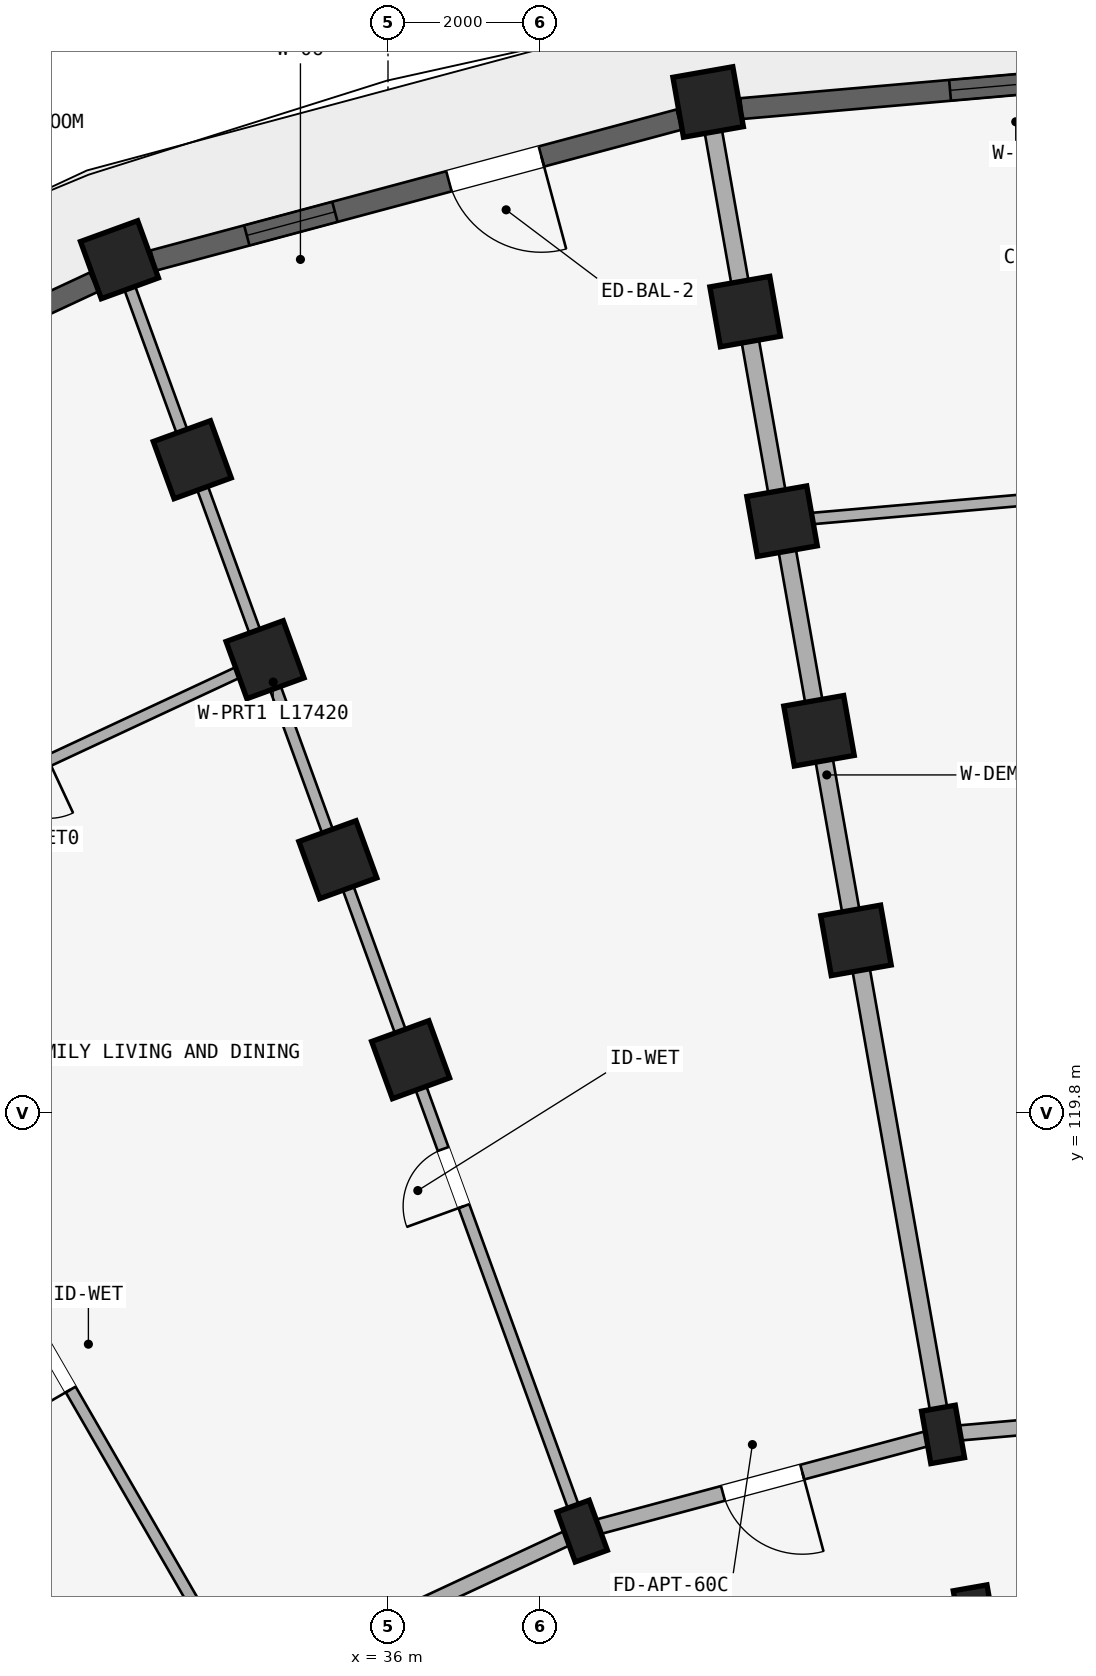
"""IFC4 building model, lengths in metres.
Left out: names, types, materials, properties, quantities, classifications, styles, units other than length and angle.
Written with IfcOpenShell. Run it as: python <this file> out.ifc"""

import sys

from ifc_helpers import new_model, si_unit, direction, frame, frame_2d, origin, origin_2d, place, context, subcontext, project, spatial, rectangle, extrude, element, fill, save


model = new_model("IFC4")
c1 = context("Model", 3, precision=1e-05, world=origin(), true_north=direction((0.0, 1.0)))
c2 = subcontext(c1, "Body", "Model", "MODEL_VIEW")
j1 = project(units=[si_unit("LENGTHUNIT", "METRE"), si_unit("PLANEANGLEUNIT", "RADIAN")], contexts=[c1])
p1 = place(None, origin())
s1 = spatial("IfcSite", under=j1, at=p1, CompositionType="ELEMENT")
p2 = place(p1, origin())
s2 = spatial("IfcBuilding", under=s1, at=p2, CompositionType="ELEMENT")
p3 = place(p2, frame((0.0, 0.0, 11.85)))
s3 = spatial("IfcBuildingStorey", under=s2, at=p3, CompositionType="ELEMENT", Elevation=11.85)
for number, where, z_axis, x_axis in (
    (1, (43.72, 113.208, 0.0), (0.0, 0.0, 1.0), (0.985, 0.174, 0.0)),
    (2, (43.303, 115.572, 0.0), (0.0, 0.0, 1.0), (0.985, 0.174, 0.0)),
):
    element("IfcColumn", number, at=place(p3, frame(where, z_axis=z_axis, x_axis=x_axis)), inside=s3, PredefinedType="COLUMN", context=c2, shape_type="SweptSolid", body=[
        extrude(rectangle(XDim=0.45, YDim=0.7, at=origin_2d()), origin(), (0.0, 0.0, 1.0), 2.93),
    ])
for number, where, z_axis, x_axis in (
    (3, (42.157, 122.071, 0.0), (0.0, 0.0, 1.0), (0.985, 0.174, 0.0)),
    (4, (41.671, 124.829, 0.0), (0.0, 0.0, 1.0), (0.985, 0.174, 0.0)),
    (5, (41.185, 127.586, 0.0), (0.0, 0.0, 1.0), (0.985, 0.174, 0.0)),
    (6, (40.698, 130.344, 0.0), (0.0, 0.0, 1.0), (0.985, 0.174, 0.0)),
    (7, (40.212, 133.101, 0.0), (0.0, 0.0, 1.0), (0.985, 0.174, 0.0)),
):
    element("IfcColumn", number, at=place(p3, frame(where, z_axis=z_axis, x_axis=x_axis)), inside=s3, PredefinedType="COLUMN", context=c2, shape_type="SweptSolid", body=[
        extrude(rectangle(XDim=0.8, YDim=0.8, at=origin_2d()), origin(), (0.0, 0.0, 1.0), 2.93),
    ])
p4 = place(p3, frame((38.555, 114.299, 0.0), z_axis=(0.0, 0.0, 1.0), x_axis=(0.939692620786, 0.342020143326, 0.0)))
e8 = element("IfcColumn", 8, at=p4, inside=s3, PredefinedType="COLUMN", context=c2, shape_type="SweptSolid", body=[
    extrude(rectangle(XDim=0.45, YDim=0.7, at=origin_2d()), origin(), (0.0, 0.0, 1.0), 2.93),
])
for number, where, z_axis, x_axis in (
    (9, (36.298, 120.501, 0.0), (0.0, 0.0, 1.0), (0.94, 0.342, 0.0)),
    (10, (35.34, 123.132, 0.0), (0.0, 0.0, 1.0), (0.94, 0.342, 0.0)),
    (11, (34.382, 125.764, 0.0), (0.0, 0.0, 1.0), (0.94, 0.342, 0.0)),
    (12, (33.425, 128.395, 0.0), (0.0, 0.0, 1.0), (0.94, 0.342, 0.0)),
    (13, (32.467, 131.026, 0.0), (0.0, 0.0, 1.0), (0.94, 0.342, 0.0)),
):
    element("IfcColumn", number, at=place(p3, frame(where, z_axis=z_axis, x_axis=x_axis)), inside=s3, PredefinedType="COLUMN", context=c2, shape_type="SweptSolid", body=[
        extrude(rectangle(XDim=0.8, YDim=0.8, at=origin_2d()), origin(), (0.0, 0.0, 1.0), 2.93),
    ])
p5 = place(p3, frame((48.2, 113.6, 0.0), z_axis=(0.0, 0.0, 1.0), x_axis=(-0.996191949488, -0.087187153726, 0.0)))
e14 = element("IfcWall", 14, at=p5, inside=s3, PredefinedType="STANDARD", context=c2, shape_type="SweptSolid", body=[
    extrude(rectangle(XDim=4.497, YDim=0.2, at=frame_2d((2.249, 0.0))), origin(), (0.0, 0.0, 1.0), 2.372),
])
p6 = place(p5, frame((1.729, 0.0, 0.0)))
e15 = element("IfcOpeningElement", 15, at=p6, cuts=e14, PredefinedType="OPENING", context=c2, shape_type="SweptSolid", body=[
    extrude(rectangle(XDim=1.04, YDim=2.15, at=frame_2d((0.52, 1.075))), frame((0.0, 0.11, 0.0), z_axis=(0.0, -1.0, 0.0), x_axis=(1.0, 0.0, 0.0)), (0.0, 0.0, 1.0), 0.22),
])
p7 = place(p3, frame((48.2, 116.0, 0.0), z_axis=(0.0, 0.0, 1.0), x_axis=(-0.996193663584, -0.087167566415, 0.0)))
e16 = element("IfcWall", 16, at=p7, inside=s3, PredefinedType="STANDARD", context=c2, shape_type="SweptSolid", body=[
    extrude(rectangle(XDim=4.916, YDim=0.2, at=frame_2d((2.458, 0.0))), origin(), (0.0, 0.0, 1.0), 2.372),
])
p8 = place(p7, frame((1.938, 0.0, 0.0)))
e17 = element("IfcOpeningElement", 17, at=p8, cuts=e16, PredefinedType="OPENING", context=c2, shape_type="SweptSolid", body=[
    extrude(rectangle(XDim=1.04, YDim=2.15, at=frame_2d((0.52, 1.075))), frame((0.0, 0.11, 0.0), z_axis=(0.0, -1.0, 0.0), x_axis=(1.0, 0.0, 0.0)), (0.0, 0.0, 1.0), 0.22),
])
p9 = place(p3, frame((43.303, 115.572, 0.0), z_axis=(0.0, 0.0, 1.0), x_axis=(-0.965930095386, -0.258803112091, 0.0)))
e18 = element("IfcWall", 18, at=p9, inside=s3, PredefinedType="STANDARD", context=c2, shape_type="SweptSolid", body=[
    extrude(rectangle(XDim=4.916, YDim=0.2, at=frame_2d((2.458, 0.0))), origin(), (0.0, 0.0, 1.0), 2.372),
])
p10 = place(p9, frame((1.918, 0.0, 0.0)))
e19 = element("IfcOpeningElement", 19, at=p10, cuts=e18, PredefinedType="OPENING", context=c2, shape_type="SweptSolid", body=[
    extrude(rectangle(XDim=1.08, YDim=2.15, at=frame_2d((0.54, 1.075))), frame((0.0, 0.11, 0.0), z_axis=(0.0, -1.0, 0.0), x_axis=(1.0, 0.0, 0.0)), (0.0, 0.0, 1.0), 0.22),
])
p11 = place(p3, frame((38.555, 114.299, 0.0), z_axis=(0.0, 0.0, 1.0), x_axis=(-0.906302381024, -0.422629854778, 0.0)))
e20 = element("IfcWall", 20, at=p11, inside=s3, PredefinedType="STANDARD", context=c2, shape_type="SweptSolid", body=[
    extrude(rectangle(XDim=4.915, YDim=0.2, at=frame_2d((2.458, 0.0))), origin(), (0.0, 0.0, 1.0), 2.372),
])
p12 = place(p3, frame((43.286, 115.67, 0.0), z_axis=(0.0, 0.0, 1.0), x_axis=(-0.173646216546, 0.984808098809, 0.0)))
e21 = element("IfcWall", 21, at=p12, inside=s3, PredefinedType="STANDARD", context=c2, shape_type="SweptSolid", body=[
    extrude(rectangle(XDim=17.42, YDim=0.23, at=frame_2d((8.71, 0.0))), origin(), (0.0, 0.0, 1.0), 2.372),
])
p13 = place(p3, frame((38.521, 114.393, 0.0), z_axis=(0.0, 0.0, 1.0), x_axis=(-0.342022120477, 0.939691901159, 0.0)))
e22 = element("IfcWall", 22, at=p13, inside=s3, PredefinedType="PARTITIONING", context=c2, shape_type="SweptSolid", body=[
    extrude(rectangle(XDim=17.42, YDim=0.15, at=frame_2d((8.71, 0.0))), origin(), (0.0, 0.0, 1.0), 2.372),
])
p14 = place(p13, frame((4.45, 0.0, 0.0)))
e23 = element("IfcOpeningElement", 23, at=p14, cuts=e22, PredefinedType="OPENING", context=c2, shape_type="SweptSolid", body=[
    extrude(rectangle(XDim=0.8, YDim=2.1, at=frame_2d((0.4, 1.05))), frame((0.0, 0.085, 0.0), z_axis=(0.0, -1.0, 0.0), x_axis=(1.0, 0.0, 0.0)), (0.0, 0.0, 1.0), 0.17),
])
p15 = place(p3, frame((34.05, 112.309, 0.0), z_axis=(0.0, 0.0, 1.0), x_axis=(-0.499997843263, 0.866026648973, 0.0)))
e24 = element("IfcWall", 24, at=p15, inside=s3, PredefinedType="PARTITIONING", context=c2, shape_type="SweptSolid", body=[
    extrude(rectangle(XDim=17.42, YDim=0.15, at=frame_2d((8.71, 0.0))), origin(), (0.0, 0.0, 1.0), 2.372),
])
p16 = place(p15, frame((4.45, 0.0, 0.0)))
e25 = element("IfcOpeningElement", 25, at=p16, cuts=e24, PredefinedType="OPENING", context=c2, shape_type="SweptSolid", body=[
    extrude(rectangle(XDim=0.8, YDim=2.1, at=frame_2d((0.4, 1.05))), frame((0.0, 0.085, 0.0), z_axis=(0.0, -1.0, 0.0), x_axis=(1.0, 0.0, 0.0)), (0.0, 0.0, 1.0), 0.17),
])
p17 = place(p3, frame((48.2, 128.2, 0.0), z_axis=(0.0, 0.0, 1.0), x_axis=(-0.996194658198, -0.087156198737, 0.0)))
e26 = element("IfcWall", 26, at=p17, inside=s3, PredefinedType="PLUMBINGWALL", context=c2, shape_type="SweptSolid", body=[
    extrude(rectangle(XDim=7.042, YDim=0.15, at=frame_2d((3.521, 0.0))), origin(), (0.0, 0.0, 1.0), 2.372),
])
p18 = place(p17, frame((3.121, 0.0, 0.0)))
e27 = element("IfcOpeningElement", 27, at=p18, cuts=e26, PredefinedType="OPENING", context=c2, shape_type="SweptSolid", body=[
    extrude(rectangle(XDim=0.8, YDim=2.1, at=frame_2d((0.4, 1.05))), frame((0.0, 0.085, 0.0), z_axis=(0.0, -1.0, 0.0), x_axis=(1.0, 0.0, 0.0)), (0.0, 0.0, 1.0), 0.17),
])
p19 = place(p3, frame((34.382, 125.764, 0.0), z_axis=(0.0, 0.0, 1.0), x_axis=(-0.906297360311, -0.422640621205, 0.0)))
e28 = element("IfcWall", 28, at=p19, inside=s3, PredefinedType="PLUMBINGWALL", context=c2, shape_type="SweptSolid", body=[
    extrude(rectangle(XDim=7.042, YDim=0.15, at=frame_2d((3.521, 0.0))), origin(), (0.0, 0.0, 1.0), 2.372),
])
p20 = place(p19, frame((3.141, 0.0, 0.0)))
e29 = element("IfcOpeningElement", 29, at=p20, cuts=e28, PredefinedType="OPENING", context=c2, shape_type="SweptSolid", body=[
    extrude(rectangle(XDim=0.76, YDim=2.05, at=frame_2d((0.38, 1.025))), frame((0.0, 0.085, 0.0), z_axis=(0.0, -1.0, 0.0), x_axis=(1.0, 0.0, 0.0)), (0.0, 0.0, 1.0), 0.17),
])
p21 = place(p3, frame((47.785, 133.638, 0.0), z_axis=(0.0, 0.0, 1.0), x_axis=(-0.99619608453, -0.08713989423, 0.0)))
e30 = element("IfcWall", 30, at=p21, inside=s3, PredefinedType="STANDARD", context=c2, shape_type="SweptSolid", body=[
    extrude(rectangle(XDim=7.164, YDim=0.275, at=frame_2d((3.582, 0.0))), origin(), (0.0, 0.0, 1.0), 2.372),
])
p22 = place(p21, frame((2.757, 0.0, 0.422)))
e31 = element("IfcOpeningElement", 31, at=p22, cuts=e30, PredefinedType="OPENING", context=c2, shape_type="SweptSolid", body=[
    extrude(rectangle(XDim=1.65, YDim=1.75, at=frame_2d((0.825, 0.875))), frame((0.0, 0.147, 0.0), z_axis=(0.0, -1.0, 0.0), x_axis=(1.0, 0.0, 0.0)), (0.0, 0.0, 1.0), 0.295),
])
p23 = place(p3, frame((39.832, 132.87, 0.0), z_axis=(0.0, 0.0, 1.0), x_axis=(-0.965923712619, -0.258826933296, 0.0)))
e32 = element("IfcWall", 32, at=p23, inside=s3, PredefinedType="STANDARD", context=c2, shape_type="SweptSolid", body=[
    extrude(rectangle(XDim=7.164, YDim=0.275, at=frame_2d((3.582, 0.0))), origin(), (0.0, 0.0, 1.0), 2.372),
])
p24 = place(p23, frame((4.69, 0.0, 0.522)))
e33 = element("IfcOpeningElement", 33, at=p24, cuts=e32, PredefinedType="OPENING", context=c2, shape_type="SweptSolid", body=[
    extrude(rectangle(XDim=1.2, YDim=1.5, at=frame_2d((0.6, 0.75))), frame((0.0, 0.147, 0.0), z_axis=(0.0, -1.0, 0.0), x_axis=(1.0, 0.0, 0.0)), (0.0, 0.0, 1.0), 0.295),
])
p25 = place(p23, frame((1.877, 0.0, 0.0)))
e34 = element("IfcOpeningElement", 34, at=p25, cuts=e32, PredefinedType="OPENING", context=c2, shape_type="SweptSolid", body=[
    extrude(rectangle(XDim=1.26, YDim=2.15, at=frame_2d((0.63, 1.075))), frame((0.0, 0.147, 0.0), z_axis=(0.0, -1.0, 0.0), x_axis=(1.0, 0.0, 0.0)), (0.0, 0.0, 1.0), 0.295),
])
p26 = place(p3, frame((32.133, 130.732, 0.0), z_axis=(0.0, 0.0, 1.0), x_axis=(-0.906300636296, -0.422633596215, 0.0)))
e35 = element("IfcWall", 35, at=p26, inside=s3, PredefinedType="STANDARD", context=c2, shape_type="SweptSolid", body=[
    extrude(rectangle(XDim=7.164, YDim=0.275, at=frame_2d((3.582, 0.0))), origin(), (0.0, 0.0, 1.0), 2.372),
])
p27 = place(p26, frame((2.532, 0.0, 0.372)))
e36 = element("IfcOpeningElement", 36, at=p27, cuts=e35, PredefinedType="OPENING", context=c2, shape_type="SweptSolid", body=[
    extrude(rectangle(XDim=2.1, YDim=1.8, at=frame_2d((1.05, 0.9))), frame((0.0, 0.147, 0.0), z_axis=(0.0, -1.0, 0.0), x_axis=(1.0, 0.0, 0.0)), (0.0, 0.0, 1.0), 0.295),
])
p28 = place(p22, origin())
e37 = element("IfcWindow", 37, at=p28, inside=s3, PartitioningType="DOUBLE_PANEL_VERTICAL", PredefinedType="WINDOW", context=c2, shape_type="SweptSolid", body=[
    extrude(rectangle(XDim=1.65, YDim=1.75, at=frame_2d((0.825, 0.875))), frame((0.0, 0.03, 0.0), z_axis=(0.0, -1.0, 0.0), x_axis=(1.0, 0.0, 0.0)), (0.0, 0.0, 1.0), 0.06),
])
fill(e31, e37)
p29 = place(p24, origin())
e38 = element("IfcWindow", 38, at=p29, inside=s3, PartitioningType="SINGLE_PANEL", PredefinedType="WINDOW", context=c2, shape_type="SweptSolid", body=[
    extrude(rectangle(XDim=1.2, YDim=1.5, at=frame_2d((0.6, 0.75))), frame((0.0, 0.03, 0.0), z_axis=(0.0, -1.0, 0.0), x_axis=(1.0, 0.0, 0.0)), (0.0, 0.0, 1.0), 0.06),
])
fill(e33, e38)
p30 = place(p14, frame((0.8, 0.0, 0.0), z_axis=(0.0, 0.0, 1.0), x_axis=(-1.0, 0.0, 0.0)))
e39 = element("IfcDoor", 39, at=p30, inside=s3, OperationType="SINGLE_SWING_RIGHT", PredefinedType="DOOR", context=c2, shape_type="SweptSolid", body=[
    extrude(rectangle(XDim=0.8, YDim=2.1, at=frame_2d((0.4, 1.05))), frame((0.0, 0.025, 0.0), z_axis=(0.0, -1.0, 0.0), x_axis=(1.0, 0.0, 0.0)), (0.0, 0.0, 1.0), 0.05),
])
fill(e23, e39)
p31 = place(p16, origin())
e40 = element("IfcDoor", 40, at=p31, inside=s3, OperationType="SINGLE_SWING_LEFT", PredefinedType="DOOR", context=c2, shape_type="SweptSolid", body=[
    extrude(rectangle(XDim=0.8, YDim=2.1, at=frame_2d((0.4, 1.05))), frame((0.0, 0.025, 0.0), z_axis=(0.0, -1.0, 0.0), x_axis=(1.0, 0.0, 0.0)), (0.0, 0.0, 1.0), 0.05),
])
fill(e25, e40)
p32 = place(p10, origin())
e41 = element("IfcDoor", 41, at=p32, inside=s3, OperationType="SINGLE_SWING_LEFT", PredefinedType="DOOR", context=c2, shape_type="SweptSolid", body=[
    extrude(rectangle(XDim=1.08, YDim=2.15, at=frame_2d((0.54, 1.075))), frame((0.0, 0.025, 0.0), z_axis=(0.0, -1.0, 0.0), x_axis=(1.0, 0.0, 0.0)), (0.0, 0.0, 1.0), 0.05),
])
fill(e19, e41)
p33 = place(p25, frame((1.26, 0.0, 0.0), z_axis=(0.0, 0.0, 1.0), x_axis=(-1.0, 0.0, 0.0)))
e42 = element("IfcDoor", 42, at=p33, inside=s3, OperationType="SINGLE_SWING_RIGHT", PredefinedType="DOOR", context=c2, shape_type="SweptSolid", body=[
    extrude(rectangle(XDim=1.26, YDim=2.15, at=frame_2d((0.63, 1.075))), frame((0.0, 0.025, 0.0), z_axis=(0.0, -1.0, 0.0), x_axis=(1.0, 0.0, 0.0)), (0.0, 0.0, 1.0), 0.05),
])
fill(e34, e42)
save(model, sys.argv[1])
